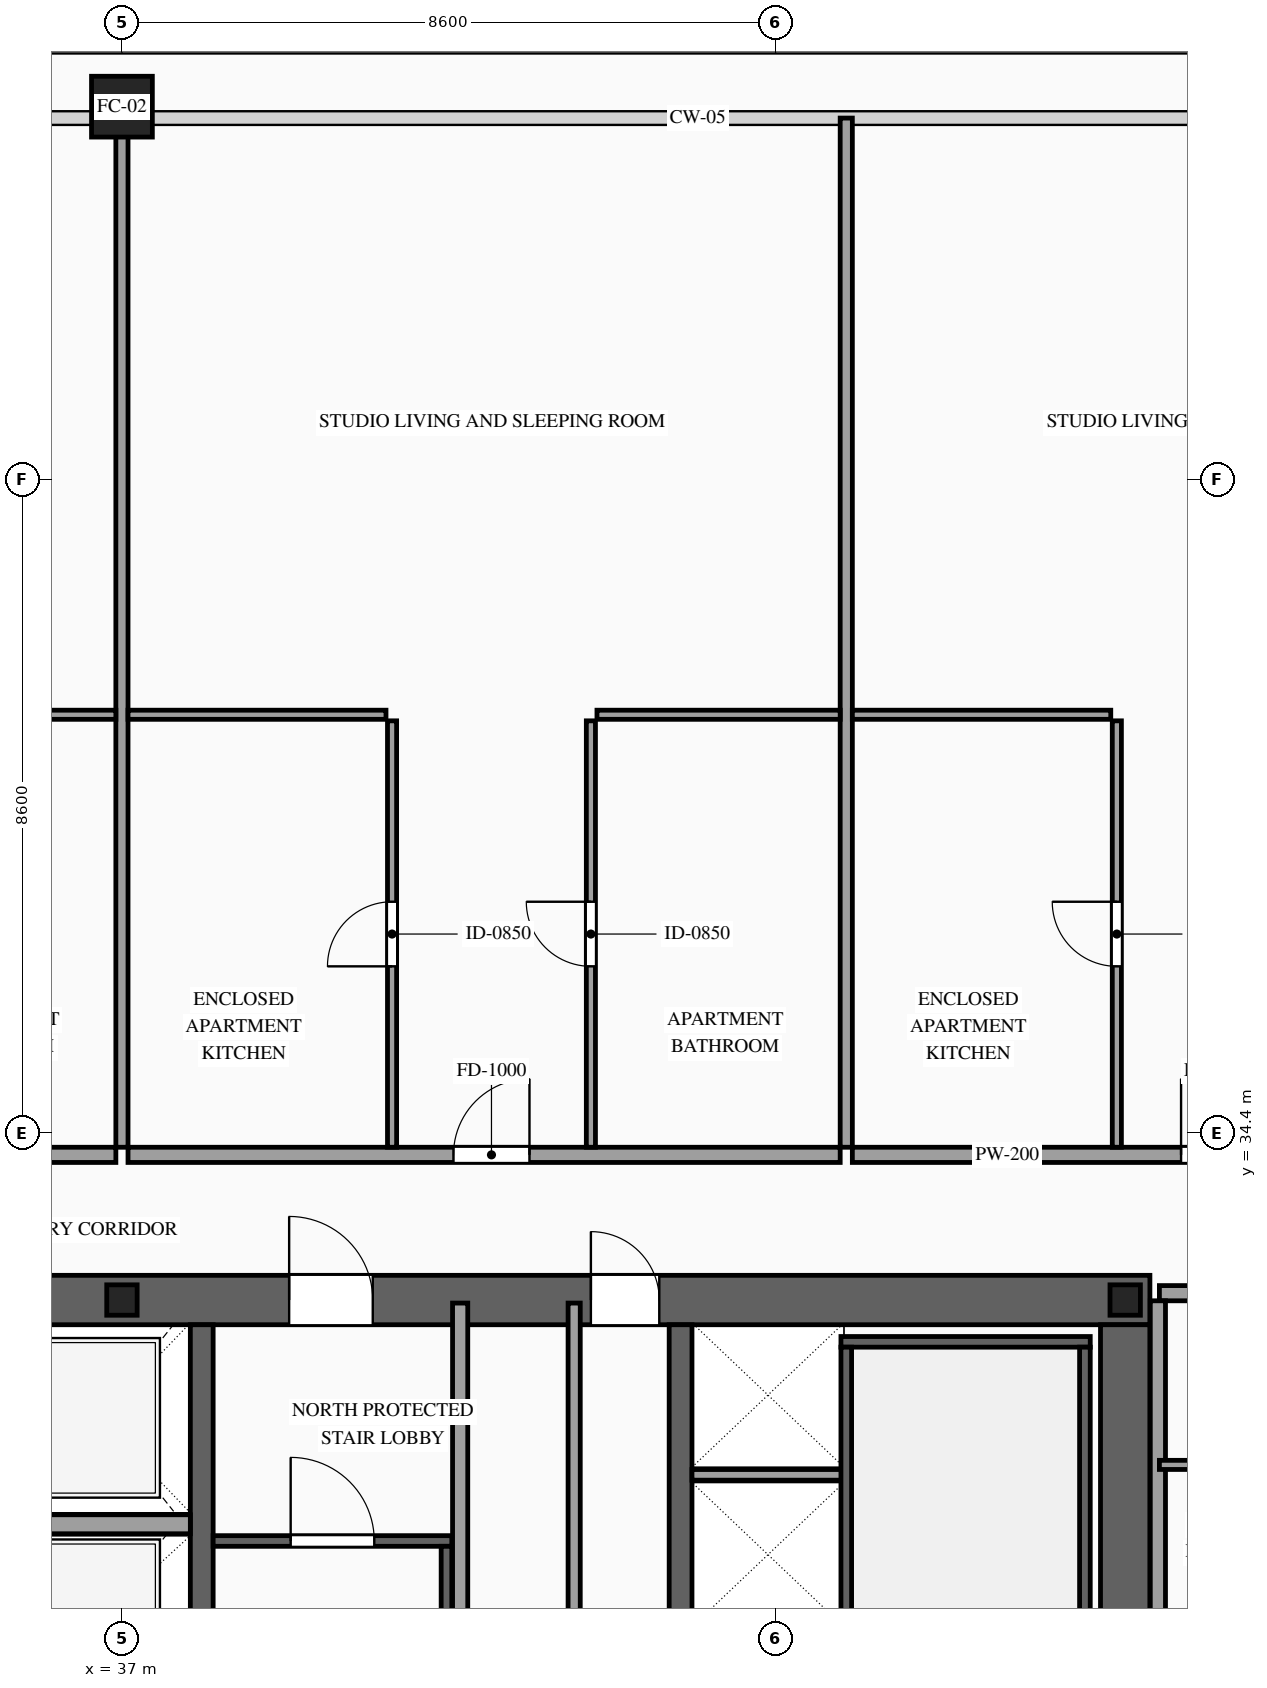
"""IFC4 building model, lengths in metres.
Left out: names, types, materials, properties, quantities, classifications, styles, units other than length and angle.
Written with IfcOpenShell. Run it as: python <this file> out.ifc"""

import sys

from ifc_helpers import new_model, si_unit, direction, frame, frame_2d, origin, origin_2d, place, context, subcontext, project, spatial, rectangle, hollow_rectangle, i_section, extrude, source, transform, mapped, element, fill, save


model = new_model("IFC4")
c1 = context("Model", 3, precision=1e-05, world=origin(), true_north=direction((0.0, 1.0)))
c2 = subcontext(c1, "Body", "Model", "MODEL_VIEW")
j1 = project(units=[si_unit("LENGTHUNIT", "METRE"), si_unit("PLANEANGLEUNIT", "RADIAN")], contexts=[c1])
p1 = place(None, origin())
s1 = spatial("IfcSite", under=j1, at=p1, CompositionType="ELEMENT")
p2 = place(p1, origin())
s2 = spatial("IfcBuilding", under=s1, at=p2, CompositionType="ELEMENT")
p3 = place(p2, frame((0.0, 0.0, 188.0)))
s3 = spatial("IfcBuildingStorey", under=s2, at=p3, CompositionType="ELEMENT", Elevation=188.0)
p4 = place(p3, frame((23.475, 32.2, 0.0), z_axis=(0.0, 0.0, 1.0), x_axis=(1.0, 0.0, 0.0)))
e1 = element("IfcWall", 1, at=p4, inside=s3, PredefinedType="SHEAR", context=c2, shape_type="SweptSolid", body=[
    extrude(rectangle(XDim=27.05, YDim=0.65, at=frame_2d((13.525, 0.0))), origin(), (0.0, 0.0, 1.0), 3.5),
])
p5 = place(p4, frame((4.595, 0.0, 0.0)))
e2 = element("IfcOpeningElement", 2, at=p5, cuts=e1, PredefinedType="OPENING", context=c2, shape_type="SweptSolid", body=[
    extrude(rectangle(XDim=0.9, YDim=2.15, at=frame_2d((0.45, 1.075))), frame((0.0, 0.34, 0.0), z_axis=(0.0, -1.0, 0.0), x_axis=(1.0, 0.0, 0.0)), (0.0, 0.0, 1.0), 0.68),
])
p6 = place(p4, frame((9.875, 0.0, 0.0)))
e3 = element("IfcOpeningElement", 3, at=p6, cuts=e1, PredefinedType="OPENING", context=c2, shape_type="SweptSolid", body=[
    extrude(rectangle(XDim=1.1, YDim=2.2, at=frame_2d((0.55, 1.1))), frame((0.0, 0.34, 0.0), z_axis=(0.0, -1.0, 0.0), x_axis=(1.0, 0.0, 0.0)), (0.0, 0.0, 1.0), 0.68),
])
p7 = place(p4, frame((15.725, 0.0, 0.0)))
e4 = element("IfcOpeningElement", 4, at=p7, cuts=e1, PredefinedType="OPENING", context=c2, shape_type="SweptSolid", body=[
    extrude(rectangle(XDim=1.1, YDim=2.2, at=frame_2d((0.55, 1.1))), frame((0.0, 0.34, 0.0), z_axis=(0.0, -1.0, 0.0), x_axis=(1.0, 0.0, 0.0)), (0.0, 0.0, 1.0), 0.68),
])
p8 = place(p4, frame((19.695, 0.0, 0.0)))
e5 = element("IfcOpeningElement", 5, at=p8, cuts=e1, PredefinedType="OPENING", context=c2, shape_type="SweptSolid", body=[
    extrude(rectangle(XDim=0.9, YDim=2.15, at=frame_2d((0.45, 1.075))), frame((0.0, 0.34, 0.0), z_axis=(0.0, -1.0, 0.0), x_axis=(1.0, 0.0, 0.0)), (0.0, 0.0, 1.0), 0.68),
])
m1 = source(origin(), c2, "Body", "SweptSolid", [
    extrude(rectangle(XDim=12.15, YDim=0.65, at=frame_2d((6.075, 0.0))), origin(), (0.0, 0.0, 1.0), 3.5),
])
p9 = place(p3, frame((50.2, 19.725, 0.0), z_axis=(0.0, 0.0, 1.0), x_axis=(0.0, 1.0, 0.0)))
e6 = element("IfcWall", 6, at=p9, inside=s3, PredefinedType="SHEAR", context=c2, shape_type="MappedRepresentation", body=[
    mapped(m1, transform((0.0, 0.0, 0.0), scale=1.0)),
])
m2 = source(origin(), c2, "Body", "SweptSolid", [
    extrude(rectangle(XDim=12.15, YDim=0.3, at=frame_2d((6.075, 0.0))), origin(), (0.0, 0.0, 1.0), 3.5),
])
for number, where, z_axis, x_axis in (
    (7, (38.05, 19.725, 0.0), (0.0, 0.0, 1.0), (0.0, 1.0, 0.0)),
    (8, (44.35, 19.725, 0.0), (0.0, 0.0, 1.0), (0.0, 1.0, 0.0)),
):
    element("IfcWall", number, at=place(p3, frame(where, z_axis=z_axis, x_axis=x_axis)), inside=s3, PredefinedType="SOLIDWALL", context=c2, shape_type="MappedRepresentation", body=[
        mapped(m2, transform((0.0, 0.0, 0.0), scale=1.0)),
    ])
m3 = source(origin(), c2, "Body", "SweptSolid", [
    extrude(i_section(OverallWidth=0.4, OverallDepth=0.4, WebThickness=0.013, FlangeThickness=0.021, at=origin_2d()), origin(), (0.0, 0.0, 1.0), 3.5),
])
for number, where, z_axis, x_axis in (
    (9, (37.0, 32.2, 0.0), (0.0, 0.0, 1.0), (1.0, 0.0, 0.0)),
    (10, (50.2, 32.2, 0.0), (0.0, 0.0, 1.0), (1.0, 0.0, 0.0)),
):
    element("IfcColumn", number, at=place(p3, frame(where, z_axis=z_axis, x_axis=x_axis)), inside=s3, PredefinedType="COLUMN", context=c2, shape_type="MappedRepresentation", body=[
        mapped(m3, transform((0.0, 0.0, 0.0), scale=1.0)),
    ])
m4 = source(origin(), c2, "Body", "SweptSolid", [
    extrude(hollow_rectangle(XDim=0.8, YDim=0.8, WallThickness=0.036, at=origin_2d()), origin(), (0.0, 0.0, 1.0), 3.5),
])
p10 = place(p3, frame((37.0, 47.9, 0.0), z_axis=(0.0, 0.0, 1.0), x_axis=(1.0, 0.0, 0.0)))
e11 = element("IfcColumn", 11, at=p10, inside=s3, PredefinedType="COLUMN", context=c2, shape_type="MappedRepresentation", body=[
    mapped(m4, transform((0.0, 0.0, 0.0), scale=1.0)),
])
m5 = source(origin(), c2, "Body", "SweptSolid", [
    extrude(rectangle(XDim=2.4, YDim=0.25, at=frame_2d((1.2, 0.0))), origin(), (0.0, 0.0, 1.0), 3.28),
])
p11 = place(p3, frame((35.5, 29.25, 0.0), z_axis=(0.0, 0.0, 1.0), x_axis=(1.0, 0.0, 0.0)))
e12 = element("IfcWall", 12, at=p11, inside=s3, PredefinedType="SOLIDWALL", context=c2, shape_type="MappedRepresentation", body=[
    mapped(m5, transform((0.0, 0.0, 0.0), scale=1.0)),
])
m6 = source(origin(), c2, "Body", "SweptSolid", [
    extrude(rectangle(XDim=2.0, YDim=0.14, at=frame_2d((1.0, 0.0))), origin(), (0.0, 0.0, 1.0), 3.28),
])
p12 = place(p3, frame((44.5, 29.9, 0.0), z_axis=(0.0, 0.0, 1.0), x_axis=(1.0, 0.0, 0.0)))
e13 = element("IfcWall", 13, at=p12, inside=s3, PredefinedType="SOLIDWALL", context=c2, shape_type="MappedRepresentation", body=[
    mapped(m6, transform((0.0, 0.0, 0.0), scale=1.0)),
])
m7 = source(origin(), c2, "Body", "SweptSolid", [
    extrude(rectangle(XDim=3.28, YDim=0.14, at=frame_2d((1.64, 0.0))), origin(), (0.0, 0.0, 1.0), 3.28),
])
p13 = place(p3, frame((46.46, 31.65, 0.0), z_axis=(0.0, 0.0, 1.0), x_axis=(1.0, 0.0, 0.0)))
e14 = element("IfcWall", 14, at=p13, inside=s3, PredefinedType="SOLIDWALL", context=c2, shape_type="MappedRepresentation", body=[
    mapped(m7, transform((0.0, 0.0, 0.0), scale=1.0)),
])
m8 = source(origin(), c2, "Body", "SweptSolid", [
    extrude(rectangle(XDim=8.94, YDim=0.14, at=frame_2d((4.47, 0.0))), origin(), (0.0, 0.0, 1.0), 3.28),
])
for number, where, z_axis, x_axis in (
    (15, (46.53, 22.64, 0.0), (0.0, 0.0, 1.0), (0.0, 1.0, 0.0)),
    (16, (49.67, 22.64, 0.0), (0.0, 0.0, 1.0), (0.0, 1.0, 0.0)),
):
    element("IfcWall", number, at=place(p3, frame(where, z_axis=z_axis, x_axis=x_axis)), inside=s3, PredefinedType="SOLIDWALL", context=c2, shape_type="MappedRepresentation", body=[
        mapped(m8, transform((0.0, 0.0, 0.0), scale=1.0)),
    ])
p14 = place(p3, frame((38.2, 29.03, 0.0), z_axis=(0.0, 0.0, 1.0), x_axis=(1.0, 0.0, 0.0)))
e17 = element("IfcWall", 17, at=p14, inside=s3, PredefinedType="SOLIDWALL", context=c2, shape_type="SweptSolid", body=[
    extrude(rectangle(XDim=3.14, YDim=0.14, at=frame_2d((1.57, 0.0))), origin(), (0.0, 0.0, 1.0), 3.28),
])
p15 = place(p14, frame((1.02, 0.0, 0.0)))
e18 = element("IfcOpeningElement", 18, at=p15, cuts=e17, PredefinedType="OPENING", context=c2, shape_type="SweptSolid", body=[
    extrude(rectangle(XDim=1.1, YDim=2.2, at=frame_2d((0.55, 1.1))), frame((0.0, 0.085, 0.0), z_axis=(0.0, -1.0, 0.0), x_axis=(1.0, 0.0, 0.0)), (0.0, 0.0, 1.0), 0.17),
])
m9 = source(origin(), c2, "Body", "SweptSolid", [
    extrude(rectangle(XDim=8.94, YDim=0.14, at=frame_2d((4.47, 0.0))), origin(), (0.0, 0.0, 1.0), 3.28),
])
p16 = place(p3, frame((41.27, 20.02, 0.0), z_axis=(0.0, 0.0, 1.0), x_axis=(0.0, 1.0, 0.0)))
e19 = element("IfcWall", 19, at=p16, inside=s3, PredefinedType="SOLIDWALL", context=c2, shape_type="MappedRepresentation", body=[
    mapped(m9, transform((0.0, 0.0, 0.0), scale=1.0)),
])
m10 = source(origin(), c2, "Body", "SweptSolid", [
    extrude(rectangle(XDim=12.72, YDim=0.2, at=frame_2d((6.36, 0.0))), origin(), (0.0, 0.0, 1.0), 3.28),
])
p17 = place(p3, frame((41.45, 19.44, 0.0), z_axis=(0.0, 0.0, 1.0), x_axis=(0.0, 1.0, 0.0)))
e20 = element("IfcWall", 20, at=p17, inside=s3, PredefinedType="PARTITIONING", context=c2, shape_type="MappedRepresentation", body=[
    mapped(m10, transform((0.0, 0.0, 0.0), scale=1.0)),
])
m11 = source(origin(), c2, "Body", "SweptSolid", [
    extrude(rectangle(XDim=10.72, YDim=0.16, at=frame_2d((5.36, 0.0))), origin(), (0.0, 0.0, 1.0), 3.28),
])
p18 = place(p3, frame((42.95, 21.44, 0.0), z_axis=(0.0, 0.0, 1.0), x_axis=(0.0, 1.0, 0.0)))
e21 = element("IfcWall", 21, at=p18, inside=s3, PredefinedType="PARTITIONING", context=c2, shape_type="MappedRepresentation", body=[
    mapped(m11, transform((0.0, 0.0, 0.0), scale=1.0)),
])
p19 = place(p3, frame((27.55, 34.11, 0.0), z_axis=(0.0, 0.0, 1.0), x_axis=(1.0, 0.0, 0.0)))
e22 = element("IfcWall", 22, at=p19, inside=s3, PredefinedType="PARTITIONING", context=c2, shape_type="SweptSolid", body=[
    extrude(rectangle(XDim=9.37, YDim=0.2, at=frame_2d((4.685, 0.0))), origin(), (0.0, 0.0, 1.0), 3.28),
])
p20 = place(p19, frame((4.282, 0.0, 0.0)))
e23 = element("IfcOpeningElement", 23, at=p20, cuts=e22, PredefinedType="OPENING", context=c2, shape_type="SweptSolid", body=[
    extrude(rectangle(XDim=1.0, YDim=2.2, at=frame_2d((0.5, 1.1))), frame((0.0, 0.115, 0.0), z_axis=(0.0, -1.0, 0.0), x_axis=(1.0, 0.0, 0.0)), (0.0, 0.0, 1.0), 0.23),
])
m12 = source(origin(), c2, "Body", "SweptSolid", [
    extrude(rectangle(XDim=13.54, YDim=0.16, at=frame_2d((6.77, 0.0))), origin(), (0.0, 0.0, 1.0), 2.687),
])
p21 = place(p3, frame((37.0, 34.21, 0.0), z_axis=(0.0, 0.0, 1.0), x_axis=(0.0, 1.0, 0.0)))
e24 = element("IfcWall", 24, at=p21, inside=s3, PredefinedType="PARTITIONING", context=c2, shape_type="MappedRepresentation", body=[
    mapped(m12, transform((0.0, 0.0, 0.0), scale=1.0)),
])
m13 = source(origin(), c2, "Body", "SweptSolid", [
    extrude(rectangle(XDim=3.2, YDim=0.12, at=frame_2d((1.6, 0.0))), origin(), (0.0, 0.0, 1.0), 2.875),
])
p22 = place(p3, frame((33.72, 39.9, 0.0), z_axis=(0.0, 0.0, 1.0), x_axis=(1.0, 0.0, 0.0)))
e25 = element("IfcWall", 25, at=p22, inside=s3, PredefinedType="PARTITIONING", context=c2, shape_type="MappedRepresentation", body=[
    mapped(m13, transform((0.0, 0.0, 0.0), scale=1.0)),
])
p23 = place(p3, frame((37.08, 34.11, 0.0), z_axis=(0.0, 0.0, 1.0), x_axis=(1.0, 0.0, 0.0)))
e26 = element("IfcWall", 26, at=p23, inside=s3, PredefinedType="PARTITIONING", context=c2, shape_type="SweptSolid", body=[
    extrude(rectangle(XDim=9.37, YDim=0.2, at=frame_2d((4.685, 0.0))), origin(), (0.0, 0.0, 1.0), 3.28),
])
p24 = place(p23, frame((4.282, 0.0, 0.0)))
e27 = element("IfcOpeningElement", 27, at=p24, cuts=e26, PredefinedType="OPENING", context=c2, shape_type="SweptSolid", body=[
    extrude(rectangle(XDim=1.0, YDim=2.2, at=frame_2d((0.5, 1.1))), frame((0.0, 0.115, 0.0), z_axis=(0.0, -1.0, 0.0), x_axis=(1.0, 0.0, 0.0)), (0.0, 0.0, 1.0), 0.23),
])
m14 = source(origin(), c2, "Body", "SweptSolid", [
    extrude(rectangle(XDim=13.54, YDim=0.16, at=frame_2d((6.77, 0.0))), origin(), (0.0, 0.0, 1.0), 3.28),
])
p25 = place(p3, frame((46.53, 34.21, 0.0), z_axis=(0.0, 0.0, 1.0), x_axis=(0.0, 1.0, 0.0)))
e28 = element("IfcWall", 28, at=p25, inside=s3, PredefinedType="PARTITIONING", context=c2, shape_type="MappedRepresentation", body=[
    mapped(m14, transform((0.0, 0.0, 0.0), scale=1.0)),
])
m15 = source(origin(), c2, "Body", "SweptSolid", [
    extrude(rectangle(XDim=3.394, YDim=0.12, at=frame_2d((1.697, 0.0))), origin(), (0.0, 0.0, 1.0), 2.875),
])
p26 = place(p3, frame((37.08, 39.9, 0.0), z_axis=(0.0, 0.0, 1.0), x_axis=(1.0, 0.0, 0.0)))
e29 = element("IfcWall", 29, at=p26, inside=s3, PredefinedType="PARTITIONING", context=c2, shape_type="MappedRepresentation", body=[
    mapped(m15, transform((0.0, 0.0, 0.0), scale=1.0)),
])
p27 = place(p3, frame((40.554, 34.21, 0.0), z_axis=(0.0, 0.0, 1.0), x_axis=(0.0, 1.0, 0.0)))
e30 = element("IfcWall", 30, at=p27, inside=s3, PredefinedType="PARTITIONING", context=c2, shape_type="SweptSolid", body=[
    extrude(rectangle(XDim=5.61, YDim=0.12, at=frame_2d((2.805, 0.0))), origin(), (0.0, 0.0, 1.0), 3.28),
])
p28 = place(p27, frame((2.38, 0.0, 0.0)))
e31 = element("IfcOpeningElement", 31, at=p28, cuts=e30, PredefinedType="OPENING", context=c2, shape_type="SweptSolid", body=[
    extrude(rectangle(XDim=0.85, YDim=2.1, at=frame_2d((0.425, 1.05))), frame((0.0, 0.075, 0.0), z_axis=(0.0, -1.0, 0.0), x_axis=(1.0, 0.0, 0.0)), (0.0, 0.0, 1.0), 0.15),
])
p29 = place(p3, frame((43.25, 39.9, 0.0), z_axis=(0.0, 0.0, 1.0), x_axis=(1.0, 0.0, 0.0)))
e32 = element("IfcWall", 32, at=p29, inside=s3, PredefinedType="PARTITIONING", context=c2, shape_type="MappedRepresentation", body=[
    mapped(m13, transform((0.0, 0.0, 0.0), scale=1.0)),
])
p30 = place(p3, frame((43.17, 34.21, 0.0), z_axis=(0.0, 0.0, 1.0), x_axis=(0.0, 1.0, 0.0)))
e33 = element("IfcWall", 33, at=p30, inside=s3, PredefinedType="PARTITIONING", context=c2, shape_type="SweptSolid", body=[
    extrude(rectangle(XDim=5.61, YDim=0.12, at=frame_2d((2.805, 0.0))), origin(), (0.0, 0.0, 1.0), 3.28),
])
p31 = place(p30, frame((2.38, 0.0, 0.0)))
e34 = element("IfcOpeningElement", 34, at=p31, cuts=e33, PredefinedType="OPENING", context=c2, shape_type="SweptSolid", body=[
    extrude(rectangle(XDim=0.85, YDim=2.1, at=frame_2d((0.425, 1.05))), frame((0.0, 0.075, 0.0), z_axis=(0.0, -1.0, 0.0), x_axis=(1.0, 0.0, 0.0)), (0.0, 0.0, 1.0), 0.15),
])
p32 = place(p3, frame((46.61, 34.11, 0.0), z_axis=(0.0, 0.0, 1.0), x_axis=(1.0, 0.0, 0.0)))
e35 = element("IfcWall", 35, at=p32, inside=s3, PredefinedType="PARTITIONING", context=c2, shape_type="SweptSolid", body=[
    extrude(rectangle(XDim=9.45, YDim=0.2, at=frame_2d((4.725, 0.0))), origin(), (0.0, 0.0, 1.0), 3.28),
])
p33 = place(p32, frame((4.325, 0.0, 0.0)))
e36 = element("IfcOpeningElement", 36, at=p33, cuts=e35, PredefinedType="OPENING", context=c2, shape_type="SweptSolid", body=[
    extrude(rectangle(XDim=1.0, YDim=2.2, at=frame_2d((0.5, 1.1))), frame((0.0, 0.115, 0.0), z_axis=(0.0, -1.0, 0.0), x_axis=(1.0, 0.0, 0.0)), (0.0, 0.0, 1.0), 0.23),
])
m16 = source(origin(), c2, "Body", "SweptSolid", [
    extrude(rectangle(XDim=3.4, YDim=0.12, at=frame_2d((1.7, 0.0))), origin(), (0.0, 0.0, 1.0), 2.875),
])
p34 = place(p3, frame((46.61, 39.9, 0.0), z_axis=(0.0, 0.0, 1.0), x_axis=(1.0, 0.0, 0.0)))
e37 = element("IfcWall", 37, at=p34, inside=s3, PredefinedType="PARTITIONING", context=c2, shape_type="MappedRepresentation", body=[
    mapped(m16, transform((0.0, 0.0, 0.0), scale=1.0)),
])
p35 = place(p3, frame((50.09, 34.21, 0.0), z_axis=(0.0, 0.0, 1.0), x_axis=(0.0, 1.0, 0.0)))
e38 = element("IfcWall", 38, at=p35, inside=s3, PredefinedType="PARTITIONING", context=c2, shape_type="SweptSolid", body=[
    extrude(rectangle(XDim=5.61, YDim=0.12, at=frame_2d((2.805, 0.0))), origin(), (0.0, 0.0, 1.0), 2.775),
])
p36 = place(p35, frame((2.38, 0.0, 0.0)))
e39 = element("IfcOpeningElement", 39, at=p36, cuts=e38, PredefinedType="OPENING", context=c2, shape_type="SweptSolid", body=[
    extrude(rectangle(XDim=0.85, YDim=2.1, at=frame_2d((0.425, 1.05))), frame((0.0, 0.075, 0.0), z_axis=(0.0, -1.0, 0.0), x_axis=(1.0, 0.0, 0.0)), (0.0, 0.0, 1.0), 0.15),
])
p37 = place(p3, frame((50.65, 32.29, 0.0), z_axis=(0.0, 0.0, 1.0), x_axis=(1.0, 0.0, 0.0)))
e40 = element("IfcWall", 40, at=p37, inside=s3, PredefinedType="PARTITIONING", context=c2, shape_type="SweptSolid", body=[
    extrude(rectangle(XDim=8.3, YDim=0.2, at=frame_2d((4.15, 0.0))), origin(), (0.0, 0.0, 1.0), 2.775),
])
p38 = place(p37, frame((3.585, 0.0, 0.0)))
e41 = element("IfcOpeningElement", 41, at=p38, cuts=e40, PredefinedType="OPENING", context=c2, shape_type="SweptSolid", body=[
    extrude(rectangle(XDim=1.0, YDim=2.2, at=frame_2d((0.5, 1.1))), frame((0.0, 0.115, 0.0), z_axis=(0.0, -1.0, 0.0), x_axis=(1.0, 0.0, 0.0)), (0.0, 0.0, 1.0), 0.23),
])
m17 = source(origin(), c2, "Body", "SweptSolid", [
    extrude(rectangle(XDim=12.78, YDim=0.2, at=frame_2d((6.39, 0.0))), origin(), (0.0, 0.0, 1.0), 3.28),
])
p39 = place(p3, frame((50.63, 19.41, 0.0), z_axis=(0.0, 0.0, 1.0), x_axis=(0.0, 1.0, 0.0)))
e42 = element("IfcWall", 42, at=p39, inside=s3, PredefinedType="PARTITIONING", context=c2, shape_type="MappedRepresentation", body=[
    mapped(m17, transform((0.0, 0.0, 0.0), scale=1.0)),
])
m18 = source(origin(), c2, "Body", "SweptSolid", [
    extrude(rectangle(XDim=2.75, YDim=0.12, at=frame_2d((1.375, 0.0))), origin(), (0.0, 0.0, 1.0), 3.28),
])
p40 = place(p3, frame((50.65, 30.031, 0.0), z_axis=(0.0, 0.0, 1.0), x_axis=(1.0, 0.0, 0.0)))
e43 = element("IfcWall", 43, at=p40, inside=s3, PredefinedType="PARTITIONING", context=c2, shape_type="MappedRepresentation", body=[
    mapped(m18, transform((0.0, 0.0, 0.0), scale=1.0)),
])
m19 = source(origin(), c2, "Body", "SweptSolid", [
    extrude(rectangle(XDim=1.1, YDim=2.2, at=frame_2d((0.55, 1.1))), frame((0.0, 0.025, 0.0), z_axis=(0.0, -1.0, 0.0), x_axis=(1.0, 0.0, 0.0)), (0.0, 0.0, 1.0), 0.05),
])
p41 = place(p15, origin())
e44 = element("IfcDoor", 44, at=p41, inside=s3, OperationType="SINGLE_SWING_LEFT", PredefinedType="DOOR", context=c2, shape_type="MappedRepresentation", body=[
    mapped(m19, transform((0.0, 0.0, 0.0), scale=1.0)),
])
fill(e18, e44)
p42 = place(p7, origin())
e45 = element("IfcDoor", 45, at=p42, inside=s3, OperationType="SINGLE_SWING_LEFT", PredefinedType="DOOR", context=c2, shape_type="MappedRepresentation", body=[
    mapped(m19, transform((0.0, 0.0, 0.0), scale=1.0)),
])
fill(e4, e45)
m20 = source(origin(), c2, "Body", "SweptSolid", [
    extrude(rectangle(XDim=0.9, YDim=2.15, at=frame_2d((0.45, 1.075))), frame((0.0, 0.025, 0.0), z_axis=(0.0, -1.0, 0.0), x_axis=(1.0, 0.0, 0.0)), (0.0, 0.0, 1.0), 0.05),
])
p43 = place(p8, origin())
e46 = element("IfcDoor", 46, at=p43, inside=s3, OperationType="SINGLE_SWING_LEFT", PredefinedType="DOOR", context=c2, shape_type="MappedRepresentation", body=[
    mapped(m20, transform((0.0, 0.0, 0.0), scale=1.0)),
])
fill(e5, e46)
m21 = source(origin(), c2, "Body", "SweptSolid", [
    extrude(rectangle(XDim=1.0, YDim=2.2, at=frame_2d((0.5, 1.1))), frame((0.0, 0.025, 0.0), z_axis=(0.0, -1.0, 0.0), x_axis=(1.0, 0.0, 0.0)), (0.0, 0.0, 1.0), 0.05),
])
p44 = place(p24, origin())
e47 = element("IfcDoor", 47, at=p44, inside=s3, OperationType="SINGLE_SWING_RIGHT", PredefinedType="DOOR", context=c2, shape_type="MappedRepresentation", body=[
    mapped(m21, transform((0.0, 0.0, 0.0), scale=1.0)),
])
fill(e27, e47)
m22 = source(origin(), c2, "Body", "SweptSolid", [
    extrude(rectangle(XDim=0.85, YDim=2.1, at=frame_2d((0.425, 1.05))), frame((0.0, 0.025, 0.0), z_axis=(0.0, -1.0, 0.0), x_axis=(1.0, 0.0, 0.0)), (0.0, 0.0, 1.0), 0.05),
])
p45 = place(p28, origin())
e48 = element("IfcDoor", 48, at=p45, inside=s3, OperationType="SINGLE_SWING_LEFT", PredefinedType="DOOR", context=c2, shape_type="MappedRepresentation", body=[
    mapped(m22, transform((0.0, 0.0, 0.0), scale=1.0)),
])
fill(e31, e48)
p46 = place(p31, origin())
e49 = element("IfcDoor", 49, at=p46, inside=s3, OperationType="SINGLE_SWING_RIGHT", PredefinedType="DOOR", context=c2, shape_type="MappedRepresentation", body=[
    mapped(m22, transform((0.0, 0.0, 0.0), scale=1.0)),
])
fill(e34, e49)
p47 = place(p33, origin())
e50 = element("IfcDoor", 50, at=p47, inside=s3, OperationType="SINGLE_SWING_LEFT", PredefinedType="DOOR", context=c2, shape_type="MappedRepresentation", body=[
    mapped(m21, transform((0.0, 0.0, 0.0), scale=1.0)),
])
fill(e36, e50)
p48 = place(p36, origin())
e51 = element("IfcDoor", 51, at=p48, inside=s3, OperationType="SINGLE_SWING_RIGHT", PredefinedType="DOOR", context=c2, shape_type="MappedRepresentation", body=[
    mapped(m22, transform((0.0, 0.0, 0.0), scale=1.0)),
])
fill(e39, e51)
save(model, sys.argv[1])
